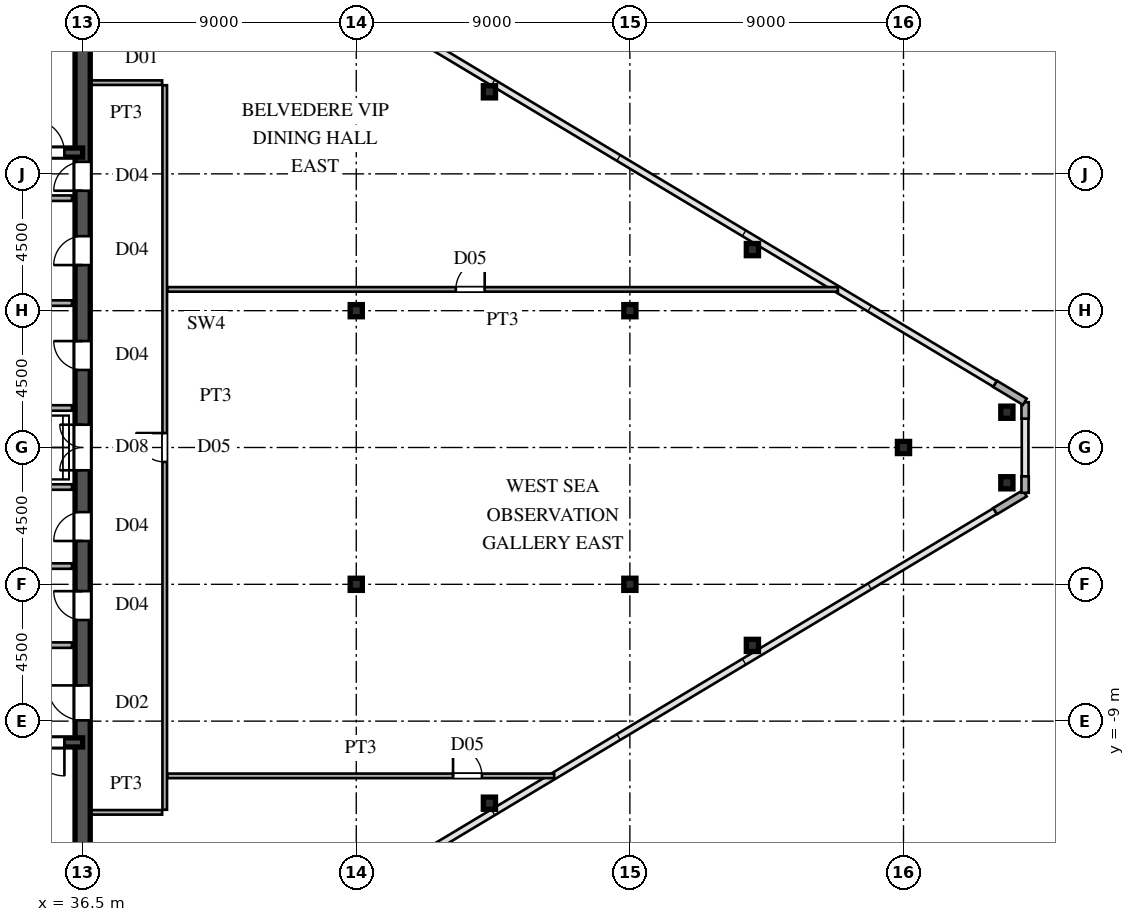
"""IFC4 building model, lengths in metres.
Left out: names, types, materials, properties, quantities, classifications, styles, units other than length and angle.
Written with IfcOpenShell. Run it as: python <this file> out.ifc"""

import sys

from ifc_helpers import new_model, si_unit, direction, frame, frame_2d, origin, origin_2d, place, context, subcontext, project, spatial, rectangle, hollow_rectangle, i_section, extrude, source, transform, mapped, element, fill, save


model = new_model("IFC4")
c1 = context("Model", 3, precision=1e-05, world=origin(), true_north=direction((0.0, 1.0)))
c2 = subcontext(c1, "Body", "Model", "MODEL_VIEW")
j1 = project(units=[si_unit("LENGTHUNIT", "METRE"), si_unit("PLANEANGLEUNIT", "RADIAN")], contexts=[c1])
p1 = place(None, origin())
s1 = spatial("IfcSite", under=j1, at=p1, CompositionType="ELEMENT")
p2 = place(p1, origin())
s2 = spatial("IfcBuilding", under=s1, at=p2, CompositionType="ELEMENT")
p3 = place(p2, frame((0.0, 0.0, 274.2)))
s3 = spatial("IfcBuildingStorey", under=s2, at=p3, CompositionType="ELEMENT", Elevation=274.2)
m1 = source(origin(), c2, "Body", "SweptSolid", [
    extrude(i_section(OverallWidth=0.4, OverallDepth=0.4, WebThickness=0.013, FlangeThickness=0.021, at=origin_2d()), origin(), (0.0, 0.0, 1.0), 4.8),
])
for number, where, z_axis, x_axis in (
    (1, (45.5, -4.5, 0.0), (0.0, 0.0, 1.0), (1.0, 0.0, 0.0)),
    (2, (45.5, 4.5, 0.0), (0.0, 0.0, 1.0), (1.0, 0.0, 0.0)),
    (3, (54.5, -4.5, 0.0), (0.0, 0.0, 1.0), (1.0, 0.0, 0.0)),
    (4, (54.5, 4.5, 0.0), (0.0, 0.0, 1.0), (1.0, 0.0, 0.0)),
    (5, (63.5, 0.0, 0.0), (0.0, 0.0, 1.0), (1.0, 0.0, 0.0)),
):
    element("IfcColumn", number, at=place(p3, frame(where, z_axis=z_axis, x_axis=x_axis)), inside=s3, PredefinedType="COLUMN", context=c2, shape_type="MappedRepresentation", body=[
        mapped(m1, transform((0.0, 0.0, 0.0), scale=1.0)),
    ])
m2 = source(origin(), c2, "Body", "SweptSolid", [
    extrude(hollow_rectangle(XDim=0.4, YDim=0.4, WallThickness=0.016, at=origin_2d()), origin(), (0.0, 0.0, 1.0), 4.8),
])
for number, where, z_axis, x_axis in (
    (6, (66.9, -1.16, 0.0), (0.0, 0.0, 1.0), (1.0, 0.0, 0.0)),
    (7, (66.9, 1.16, 0.0), (0.0, 0.0, 1.0), (1.0, 0.0, 0.0)),
    (8, (49.88, -11.699, 0.0), (0.0, 0.0, 1.0), (1.0, 0.0, 0.0)),
    (9, (58.53, -6.509, 0.0), (0.0, 0.0, 1.0), (1.0, 0.0, 0.0)),
    (10, (49.88, 11.699, 0.0), (0.0, 0.0, 1.0), (1.0, 0.0, 0.0)),
    (11, (58.53, 6.509, 0.0), (0.0, 0.0, 1.0), (1.0, 0.0, 0.0)),
):
    element("IfcColumn", number, at=place(p3, frame(where, z_axis=z_axis, x_axis=x_axis)), inside=s3, PredefinedType="COLUMN", context=c2, shape_type="MappedRepresentation", body=[
        mapped(m2, transform((0.0, 0.0, 0.0), scale=1.0)),
    ])
p4 = place(p3, frame((66.514, -2.092, 0.0), z_axis=(0.0, 0.0, 1.0), x_axis=(0.85743623509, 0.514590228002, 0.0)))
e12 = element("IfcWall", 12, at=p4, inside=s3, PredefinedType="SOLIDWALL", context=c2, shape_type="SweptSolid", body=[
    extrude(rectangle(XDim=1.14, YDim=0.24, at=frame_2d((0.57, 0.0))), origin(), (0.0, 0.0, 1.0), 4.52),
])
for number, where, z_axis, x_axis in (
    (13, (67.5, -1.49, 0.0), (0.0, 0.0, 1.0), (0.0, 1.0, 0.0)),
    (14, (67.5, 0.95, 0.0), (0.0, 0.0, 1.0), (0.0, 1.0, 0.0)),
):
    element("IfcWall", number, at=place(p3, frame(where, z_axis=z_axis, x_axis=x_axis)), inside=s3, PredefinedType="SOLIDWALL", context=c2, shape_type="SweptSolid", body=[
        extrude(rectangle(XDim=0.54, YDim=0.24, at=frame_2d((0.27, 0.0))), origin(), (0.0, 0.0, 1.0), 4.52),
    ])
p5 = place(p3, frame((67.491, 1.505, 0.0), z_axis=(0.0, 0.0, 1.0), x_axis=(-0.85743623509, 0.514590228002, 0.0)))
e15 = element("IfcWall", 15, at=p5, inside=s3, PredefinedType="SOLIDWALL", context=c2, shape_type="SweptSolid", body=[
    extrude(rectangle(XDim=1.14, YDim=0.24, at=frame_2d((0.57, 0.0))), origin(), (0.0, 0.0, 1.0), 4.52),
])
p6 = place(p3, frame((36.5, -13.65, 0.0), z_axis=(0.0, 0.0, 1.0), x_axis=(0.0, 1.0, 0.0)))
e16 = element("IfcWall", 16, at=p6, inside=s3, PredefinedType="SHEAR", context=c2, shape_type="SweptSolid", body=[
    extrude(rectangle(XDim=7.15, YDim=0.5, at=frame_2d((3.575, 0.0))), origin(), (0.0, 0.0, 1.0), 4.52),
])
p7 = place(p6, frame((4.675, 0.0, 0.0)))
e17 = element("IfcOpeningElement", 17, at=p7, cuts=e16, PredefinedType="OPENING", context=c2, shape_type="SweptSolid", body=[
    extrude(rectangle(XDim=1.15, YDim=2.2, at=frame_2d((0.575, 1.1))), frame((0.0, 0.26, 0.0), z_axis=(0.0, -1.0, 0.0), x_axis=(1.0, 0.0, 0.0)), (0.0, 0.0, 1.0), 0.52),
])
p8 = place(p3, frame((36.5, -1.3, 0.0), z_axis=(0.0, 0.0, 1.0), x_axis=(0.0, 1.0, 0.0)))
e18 = element("IfcWall", 18, at=p8, inside=s3, PredefinedType="SHEAR", context=c2, shape_type="SweptSolid", body=[
    extrude(rectangle(XDim=2.6, YDim=0.5, at=frame_2d((1.3, 0.0))), origin(), (0.0, 0.0, 1.0), 4.52),
])
p9 = place(p8, frame((0.55, 0.0, 0.0)))
e19 = element("IfcOpeningElement", 19, at=p9, cuts=e18, PredefinedType="OPENING", context=c2, shape_type="SweptSolid", body=[
    extrude(rectangle(XDim=1.5, YDim=2.3, at=frame_2d((0.75, 1.15))), frame((0.0, 0.26, 0.0), z_axis=(0.0, -1.0, 0.0), x_axis=(1.0, 0.0, 0.0)), (0.0, 0.0, 1.0), 0.52),
])
p10 = place(p3, frame((36.5, 8.2, 0.0), z_axis=(0.0, 0.0, 1.0), x_axis=(0.0, 1.0, 0.0)))
e20 = element("IfcWall", 20, at=p10, inside=s3, PredefinedType="SHEAR", context=c2, shape_type="SweptSolid", body=[
    extrude(rectangle(XDim=5.45, YDim=0.5, at=frame_2d((2.725, 0.0))), origin(), (0.0, 0.0, 1.0), 4.52),
])
p11 = place(p10, frame((0.245, 0.0, 0.0)))
e21 = element("IfcOpeningElement", 21, at=p11, cuts=e20, PredefinedType="OPENING", context=c2, shape_type="SweptSolid", body=[
    extrude(rectangle(XDim=0.95, YDim=2.15, at=frame_2d((0.475, 1.075))), frame((0.0, 0.26, 0.0), z_axis=(0.0, -1.0, 0.0), x_axis=(1.0, 0.0, 0.0)), (0.0, 0.0, 1.0), 0.52),
])
p12 = place(p3, frame((36.5, -6.5, 0.0), z_axis=(0.0, 0.0, 1.0), x_axis=(0.0, 1.0, 0.0)))
e22 = element("IfcWall", 22, at=p12, inside=s3, PredefinedType="SHEAR", context=c2, shape_type="SweptSolid", body=[
    extrude(rectangle(XDim=2.6, YDim=0.5, at=frame_2d((1.3, 0.0))), origin(), (0.0, 0.0, 1.0), 4.52),
])
p13 = place(p12, frame((0.825, 0.0, 0.0)))
e23 = element("IfcOpeningElement", 23, at=p13, cuts=e22, PredefinedType="OPENING", context=c2, shape_type="SweptSolid", body=[
    extrude(rectangle(XDim=0.95, YDim=2.15, at=frame_2d((0.475, 1.075))), frame((0.0, 0.26, 0.0), z_axis=(0.0, -1.0, 0.0), x_axis=(1.0, 0.0, 0.0)), (0.0, 0.0, 1.0), 0.52),
])
p14 = place(p3, frame((36.5, -3.9, 0.0), z_axis=(0.0, 0.0, 1.0), x_axis=(0.0, 1.0, 0.0)))
e24 = element("IfcWall", 24, at=p14, inside=s3, PredefinedType="SHEAR", context=c2, shape_type="SweptSolid", body=[
    extrude(rectangle(XDim=2.6, YDim=0.5, at=frame_2d((1.3, 0.0))), origin(), (0.0, 0.0, 1.0), 4.52),
])
p15 = place(p14, frame((0.825, 0.0, 0.0)))
e25 = element("IfcOpeningElement", 25, at=p15, cuts=e24, PredefinedType="OPENING", context=c2, shape_type="SweptSolid", body=[
    extrude(rectangle(XDim=0.95, YDim=2.15, at=frame_2d((0.475, 1.075))), frame((0.0, 0.26, 0.0), z_axis=(0.0, -1.0, 0.0), x_axis=(1.0, 0.0, 0.0)), (0.0, 0.0, 1.0), 0.52),
])
p16 = place(p3, frame((36.5, 1.3, 0.0), z_axis=(0.0, 0.0, 1.0), x_axis=(0.0, 1.0, 0.0)))
e26 = element("IfcWall", 26, at=p16, inside=s3, PredefinedType="SHEAR", context=c2, shape_type="SweptSolid", body=[
    extrude(rectangle(XDim=3.45, YDim=0.5, at=frame_2d((1.725, 0.0))), origin(), (0.0, 0.0, 1.0), 4.52),
])
p17 = place(p16, frame((1.25, 0.0, 0.0)))
e27 = element("IfcOpeningElement", 27, at=p17, cuts=e26, PredefinedType="OPENING", context=c2, shape_type="SweptSolid", body=[
    extrude(rectangle(XDim=0.95, YDim=2.15, at=frame_2d((0.475, 1.075))), frame((0.0, 0.26, 0.0), z_axis=(0.0, -1.0, 0.0), x_axis=(1.0, 0.0, 0.0)), (0.0, 0.0, 1.0), 0.52),
])
p18 = place(p3, frame((36.5, 4.75, 0.0), z_axis=(0.0, 0.0, 1.0), x_axis=(0.0, 1.0, 0.0)))
e28 = element("IfcWall", 28, at=p18, inside=s3, PredefinedType="SHEAR", context=c2, shape_type="SweptSolid", body=[
    extrude(rectangle(XDim=3.45, YDim=0.5, at=frame_2d((1.725, 0.0))), origin(), (0.0, 0.0, 1.0), 4.52),
])
p19 = place(p18, frame((1.25, 0.0, 0.0)))
e29 = element("IfcOpeningElement", 29, at=p19, cuts=e28, PredefinedType="OPENING", context=c2, shape_type="SweptSolid", body=[
    extrude(rectangle(XDim=0.95, YDim=2.15, at=frame_2d((0.475, 1.075))), frame((0.0, 0.26, 0.0), z_axis=(0.0, -1.0, 0.0), x_axis=(1.0, 0.0, 0.0)), (0.0, 0.0, 1.0), 0.52),
])
p20 = place(p3, frame((27.5, -9.7, 0.0), z_axis=(0.0, 0.0, 1.0), x_axis=(1.0, 0.0, 0.0)))
e30 = element("IfcWall", 30, at=p20, inside=s3, PredefinedType="SHEAR", context=c2, shape_type="SweptSolid", body=[
    extrude(rectangle(XDim=9.0, YDim=0.3, at=frame_2d((4.5, 0.0))), origin(), (0.0, 0.0, 1.0), 4.52),
])
p21 = place(p20, frame((7.3, 0.0, 0.0)))
e31 = element("IfcOpeningElement", 31, at=p21, cuts=e30, PredefinedType="OPENING", context=c2, shape_type="SweptSolid", body=[
    extrude(rectangle(XDim=1.1, YDim=2.2, at=frame_2d((0.55, 1.1))), frame((0.0, 0.16, 0.0), z_axis=(0.0, -1.0, 0.0), x_axis=(1.0, 0.0, 0.0)), (0.0, 0.0, 1.0), 0.32),
])
p22 = place(p3, frame((27.5, 9.7, 0.0), z_axis=(0.0, 0.0, 1.0), x_axis=(1.0, 0.0, 0.0)))
e32 = element("IfcWall", 32, at=p22, inside=s3, PredefinedType="SHEAR", context=c2, shape_type="SweptSolid", body=[
    extrude(rectangle(XDim=9.0, YDim=0.3, at=frame_2d((4.5, 0.0))), origin(), (0.0, 0.0, 1.0), 4.52),
])
p23 = place(p22, frame((7.3, 0.0, 0.0)))
e33 = element("IfcOpeningElement", 33, at=p23, cuts=e32, PredefinedType="OPENING", context=c2, shape_type="SweptSolid", body=[
    extrude(rectangle(XDim=1.1, YDim=2.2, at=frame_2d((0.55, 1.1))), frame((0.0, 0.16, 0.0), z_axis=(0.0, -1.0, 0.0), x_axis=(1.0, 0.0, 0.0)), (0.0, 0.0, 1.0), 0.32),
])
for number, where, z_axis, x_axis in (
    (34, (30.45, -6.5, 0.0), (0.0, 0.0, 1.0), (1.0, 0.0, 0.0)),
    (35, (30.45, 8.2, 0.0), (0.0, 0.0, 1.0), (1.0, 0.0, 0.0)),
):
    element("IfcWall", number, at=place(p3, frame(where, z_axis=z_axis, x_axis=x_axis)), inside=s3, PredefinedType="PARTITIONING", context=c2, shape_type="SweptSolid", body=[
        extrude(rectangle(XDim=5.7, YDim=0.18, at=frame_2d((2.85, 0.0))), origin(), (0.0, 0.0, 1.0), 4.52),
    ])
for number, where, z_axis, x_axis in (
    (36, (33.2, -1.3, 0.0), (0.0, 0.0, 1.0), (1.0, 0.0, 0.0)),
    (37, (33.2, 1.3, 0.0), (0.0, 0.0, 1.0), (1.0, 0.0, 0.0)),
    (38, (33.2, -3.9, 0.0), (0.0, 0.0, 1.0), (1.0, 0.0, 0.0)),
    (39, (33.2, 4.75, 0.0), (0.0, 0.0, 1.0), (1.0, 0.0, 0.0)),
):
    element("IfcWall", number, at=place(p3, frame(where, z_axis=z_axis, x_axis=x_axis)), inside=s3, PredefinedType="PARTITIONING", context=c2, shape_type="SweptSolid", body=[
        extrude(rectangle(XDim=2.95, YDim=0.18, at=frame_2d((1.475, 0.0))), origin(), (0.0, 0.0, 1.0), 4.52),
    ])
p24 = place(p3, frame((36.755, -12.0, 0.0), z_axis=(0.0, 0.0, 1.0), x_axis=(1.0, 0.0, 0.0)))
e40 = element("IfcWall", 40, at=p24, inside=s3, PredefinedType="PARTITIONING", context=c2, shape_type="SweptSolid", body=[
    extrude(rectangle(XDim=2.36, YDim=0.15, at=frame_2d((1.18, 0.0))), origin(), (0.0, 0.0, 1.0), 4.52),
])
p25 = place(p3, frame((39.285, -10.8, 0.0), z_axis=(0.0, 0.0, 1.0), x_axis=(1.0, 0.0, 0.0)))
e41 = element("IfcWall", 41, at=p25, inside=s3, PredefinedType="PARTITIONING", context=c2, shape_type="SweptSolid", body=[
    extrude(rectangle(XDim=12.725, YDim=0.15, at=frame_2d((6.363, 0.0))), origin(), (0.0, 0.0, 1.0), 4.52),
])
p26 = place(p25, frame((9.399, 0.0, 0.0)))
e42 = element("IfcOpeningElement", 42, at=p26, cuts=e41, PredefinedType="OPENING", context=c2, shape_type="SweptSolid", body=[
    extrude(rectangle(XDim=0.95, YDim=2.15, at=frame_2d((0.475, 1.075))), frame((0.0, 0.085, 0.0), z_axis=(0.0, -1.0, 0.0), x_axis=(1.0, 0.0, 0.0)), (0.0, 0.0, 1.0), 0.17),
])
p27 = place(p3, frame((39.285, 5.2, 0.0), z_axis=(0.0, 0.0, 1.0), x_axis=(1.0, 0.0, 0.0)))
e43 = element("IfcWall", 43, at=p27, inside=s3, PredefinedType="PARTITIONING", context=c2, shape_type="SweptSolid", body=[
    extrude(rectangle(XDim=22.058, YDim=0.15, at=frame_2d((11.029, 0.0))), origin(), (0.0, 0.0, 1.0), 4.52),
])
p28 = place(p27, frame((9.49, 0.0, 0.0)))
e44 = element("IfcOpeningElement", 44, at=p28, cuts=e43, PredefinedType="OPENING", context=c2, shape_type="SweptSolid", body=[
    extrude(rectangle(XDim=0.95, YDim=2.15, at=frame_2d((0.475, 1.075))), frame((0.0, 0.085, 0.0), z_axis=(0.0, -1.0, 0.0), x_axis=(1.0, 0.0, 0.0)), (0.0, 0.0, 1.0), 0.17),
])
p29 = place(p3, frame((36.755, 12.0, 0.0), z_axis=(0.0, 0.0, 1.0), x_axis=(1.0, 0.0, 0.0)))
e45 = element("IfcWall", 45, at=p29, inside=s3, PredefinedType="PARTITIONING", context=c2, shape_type="SweptSolid", body=[
    extrude(rectangle(XDim=2.36, YDim=0.15, at=frame_2d((1.18, 0.0))), origin(), (0.0, 0.0, 1.0), 4.52),
])
p30 = place(p3, frame((39.2, -11.915, 0.0), z_axis=(0.0, 0.0, 1.0), x_axis=(0.0, 1.0, 0.0)))
e46 = element("IfcWall", 46, at=p30, inside=s3, PredefinedType="PARTITIONING", context=c2, shape_type="SweptSolid", body=[
    extrude(rectangle(XDim=23.83, YDim=0.15, at=frame_2d((11.915, 0.0))), origin(), (0.0, 0.0, 1.0), 4.52),
])
p31 = place(p30, frame((11.44, 0.0, 0.0)))
e47 = element("IfcOpeningElement", 47, at=p31, cuts=e46, PredefinedType="OPENING", context=c2, shape_type="SweptSolid", body=[
    extrude(rectangle(XDim=0.95, YDim=2.15, at=frame_2d((0.475, 1.075))), frame((0.0, 0.085, 0.0), z_axis=(0.0, -1.0, 0.0), x_axis=(1.0, 0.0, 0.0)), (0.0, 0.0, 1.0), 0.17),
])
m3 = source(origin(), c2, "Body", "SweptSolid", [
    extrude(rectangle(XDim=1.15, YDim=2.2, at=frame_2d((0.575, 1.1))), frame((0.0, 0.025, 0.0), z_axis=(0.0, -1.0, 0.0), x_axis=(1.0, 0.0, 0.0)), (0.0, 0.0, 1.0), 0.05),
])
p32 = place(p7, origin())
e48 = element("IfcDoor", 48, at=p32, inside=s3, OperationType="SINGLE_SWING_RIGHT", PredefinedType="DOOR", context=c2, shape_type="MappedRepresentation", body=[
    mapped(m3, transform((0.0, 0.0, 0.0), scale=1.0)),
])
fill(e17, e48)
m4 = source(origin(), c2, "Body", "SweptSolid", [
    extrude(rectangle(XDim=1.5, YDim=2.3, at=frame_2d((0.75, 1.15))), frame((0.0, 0.025, 0.0), z_axis=(0.0, -1.0, 0.0), x_axis=(1.0, 0.0, 0.0)), (0.0, 0.0, 1.0), 0.05),
])
p33 = place(p9, origin())
e49 = element("IfcDoor", 49, at=p33, inside=s3, OperationType="DOUBLE_SWING_LEFT", PredefinedType="DOOR", context=c2, shape_type="MappedRepresentation", body=[
    mapped(m4, transform((0.0, 0.0, 0.0), scale=1.0)),
])
fill(e19, e49)
m5 = source(origin(), c2, "Body", "SweptSolid", [
    extrude(rectangle(XDim=0.95, YDim=2.15, at=frame_2d((0.475, 1.075))), frame((0.0, 0.025, 0.0), z_axis=(0.0, -1.0, 0.0), x_axis=(1.0, 0.0, 0.0)), (0.0, 0.0, 1.0), 0.05),
])
p34 = place(p11, origin())
e50 = element("IfcDoor", 50, at=p34, inside=s3, OperationType="SINGLE_SWING_LEFT", PredefinedType="DOOR", context=c2, shape_type="MappedRepresentation", body=[
    mapped(m5, transform((0.0, 0.0, 0.0), scale=1.0)),
])
fill(e21, e50)
p35 = place(p13, origin())
e51 = element("IfcDoor", 51, at=p35, inside=s3, OperationType="SINGLE_SWING_RIGHT", PredefinedType="DOOR", context=c2, shape_type="MappedRepresentation", body=[
    mapped(m5, transform((0.0, 0.0, 0.0), scale=1.0)),
])
fill(e23, e51)
p36 = place(p15, origin())
e52 = element("IfcDoor", 52, at=p36, inside=s3, OperationType="SINGLE_SWING_LEFT", PredefinedType="DOOR", context=c2, shape_type="MappedRepresentation", body=[
    mapped(m5, transform((0.0, 0.0, 0.0), scale=1.0)),
])
fill(e25, e52)
p37 = place(p17, origin())
e53 = element("IfcDoor", 53, at=p37, inside=s3, OperationType="SINGLE_SWING_RIGHT", PredefinedType="DOOR", context=c2, shape_type="MappedRepresentation", body=[
    mapped(m5, transform((0.0, 0.0, 0.0), scale=1.0)),
])
fill(e27, e53)
p38 = place(p19, origin())
e54 = element("IfcDoor", 54, at=p38, inside=s3, OperationType="SINGLE_SWING_LEFT", PredefinedType="DOOR", context=c2, shape_type="MappedRepresentation", body=[
    mapped(m5, transform((0.0, 0.0, 0.0), scale=1.0)),
])
fill(e29, e54)
m6 = source(origin(), c2, "Body", "SweptSolid", [
    extrude(rectangle(XDim=1.1, YDim=2.2, at=frame_2d((0.55, 1.1))), frame((0.0, 0.025, 0.0), z_axis=(0.0, -1.0, 0.0), x_axis=(1.0, 0.0, 0.0)), (0.0, 0.0, 1.0), 0.05),
])
p39 = place(p21, frame((1.1, 0.0, 0.0), z_axis=(0.0, 0.0, 1.0), x_axis=(-1.0, 0.0, 0.0)))
e55 = element("IfcDoor", 55, at=p39, inside=s3, OperationType="SINGLE_SWING_RIGHT", PredefinedType="DOOR", context=c2, shape_type="MappedRepresentation", body=[
    mapped(m6, transform((0.0, 0.0, 0.0), scale=1.0)),
])
fill(e31, e55)
p40 = place(p23, origin())
e56 = element("IfcDoor", 56, at=p40, inside=s3, OperationType="SINGLE_SWING_LEFT", PredefinedType="DOOR", context=c2, shape_type="MappedRepresentation", body=[
    mapped(m6, transform((0.0, 0.0, 0.0), scale=1.0)),
])
fill(e33, e56)
m7 = source(origin(), c2, "Body", "SweptSolid", [
    extrude(rectangle(XDim=0.95, YDim=2.15, at=frame_2d((0.475, 1.075))), frame((0.0, 0.025, 0.0), z_axis=(0.0, -1.0, 0.0), x_axis=(1.0, 0.0, 0.0)), (0.0, 0.0, 1.0), 0.05),
])
p41 = place(p26, origin())
e57 = element("IfcDoor", 57, at=p41, inside=s3, OperationType="SINGLE_SWING_LEFT", PredefinedType="DOOR", context=c2, shape_type="MappedRepresentation", body=[
    mapped(m7, transform((0.0, 0.0, 0.0), scale=1.0)),
])
fill(e42, e57)
p42 = place(p28, origin())
e58 = element("IfcDoor", 58, at=p42, inside=s3, OperationType="SINGLE_SWING_RIGHT", PredefinedType="DOOR", context=c2, shape_type="MappedRepresentation", body=[
    mapped(m7, transform((0.0, 0.0, 0.0), scale=1.0)),
])
fill(e44, e58)
p43 = place(p31, origin())
e59 = element("IfcDoor", 59, at=p43, inside=s3, OperationType="SINGLE_SWING_RIGHT", PredefinedType="DOOR", context=c2, shape_type="MappedRepresentation", body=[
    mapped(m7, transform((0.0, 0.0, 0.0), scale=1.0)),
])
fill(e47, e59)
save(model, sys.argv[1])
